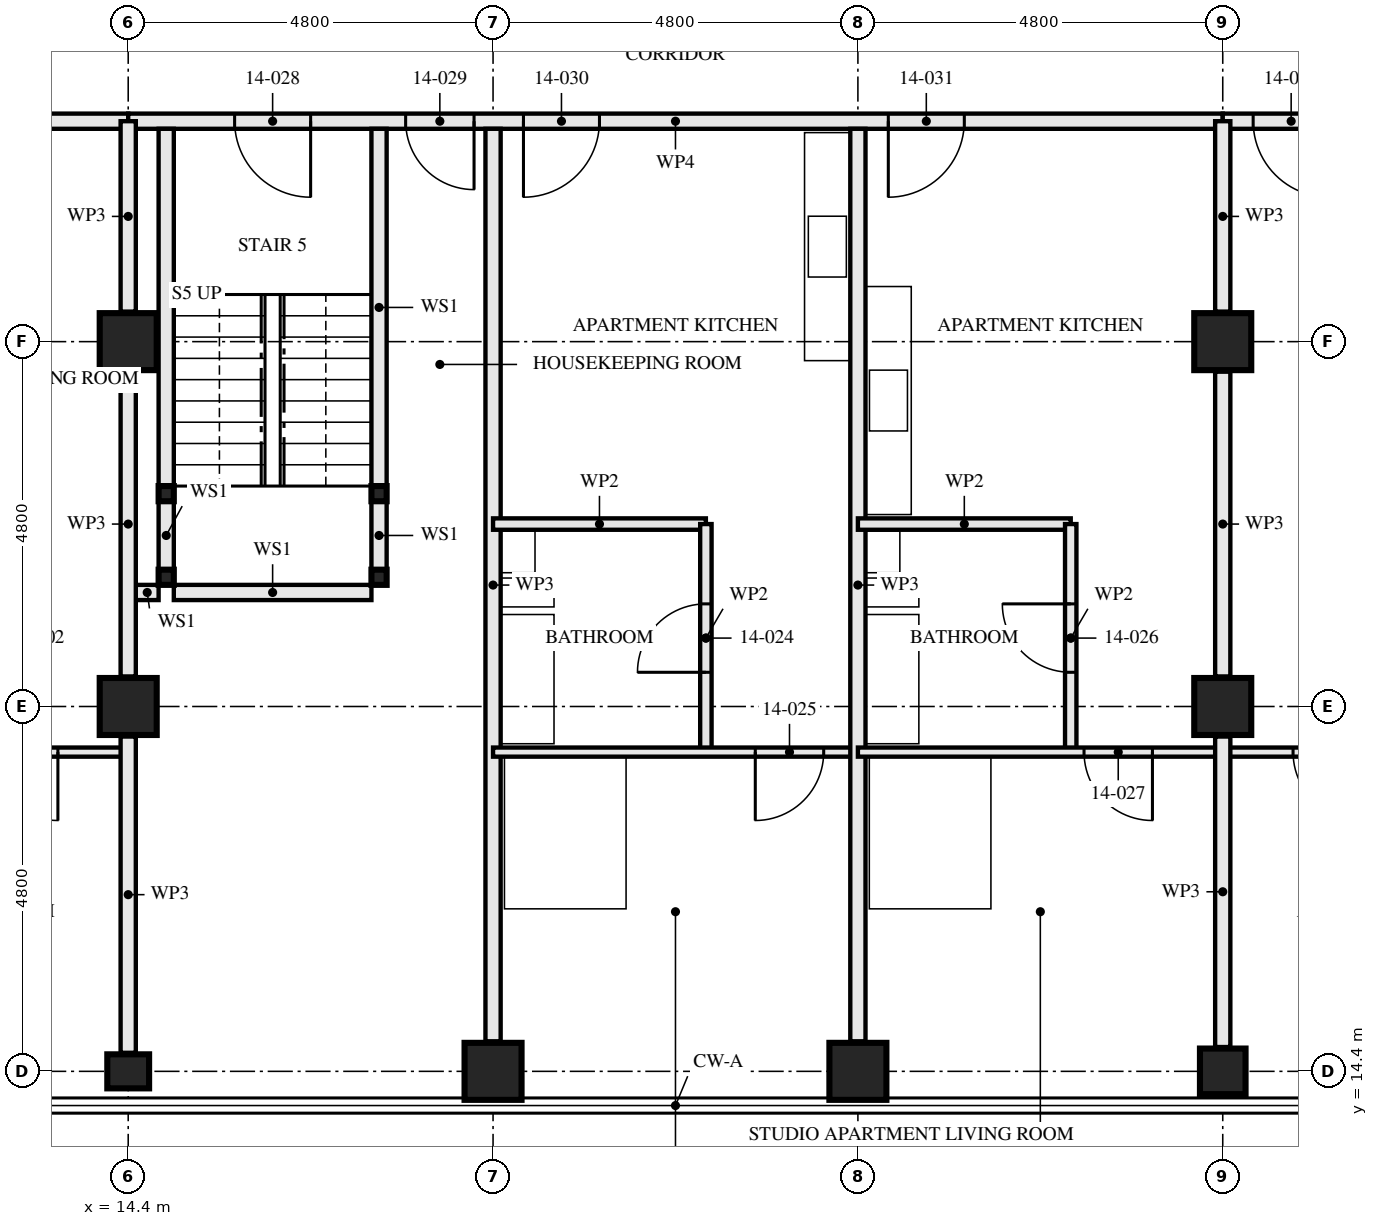
"""IFC4 building model, lengths in metres.
Left out: names, types, materials, properties, quantities, classifications, styles, units other than length and angle.
Written with IfcOpenShell. Run it as: python <this file> out.ifc"""

import sys

from ifc_helpers import new_model, si_unit, direction, frame, frame_2d, origin, origin_2d, place, context, subcontext, project, spatial, rectangle, hollow_rectangle, i_section, extrude, element, fill, save


model = new_model("IFC4")
c1 = context("Model", 3, precision=1e-05, world=origin(), true_north=direction((0.0, 1.0)))
c2 = subcontext(c1, "Body", "Model", "MODEL_VIEW")
j1 = project(units=[si_unit("LENGTHUNIT", "METRE"), si_unit("PLANEANGLEUNIT", "RADIAN")], contexts=[c1])
p1 = place(None, origin())
s1 = spatial("IfcSite", under=j1, at=p1, CompositionType="ELEMENT")
p2 = place(p1, origin())
s2 = spatial("IfcBuilding", under=s1, at=p2, CompositionType="ELEMENT")
p3 = place(p2, frame((0.0, 0.0, 55.0)))
s3 = spatial("IfcBuildingStorey", under=s2, at=p3, CompositionType="ELEMENT", Elevation=55.0)
p4 = place(p3, frame((14.4, 14.4, 0.0), z_axis=(0.0, 0.0, 1.0), x_axis=(0.0, 1.0, 0.0)))
e1 = element("IfcColumn", 1, at=p4, inside=s3, PredefinedType="COLUMN", context=c2, shape_type="SweptSolid", body=[
    extrude(i_section(OverallWidth=0.448, OverallDepth=0.55, WebThickness=0.072, FlangeThickness=0.115, FilletRadius=0.015, at=origin_2d()), origin(), (0.0, 0.0, 1.0), 3.5),
])
for number, where, z_axis, x_axis in (
    (2, (14.4, 19.2, 0.0), (0.0, 0.0, 1.0), (1.0, 0.0, 0.0)),
    (3, (14.4, 24.0, 0.0), (0.0, 0.0, 1.0), (1.0, 0.0, 0.0)),
    (4, (19.2, 14.4, 0.0), (0.0, 0.0, 1.0), (0.0, 1.0, 0.0)),
    (5, (24.0, 14.4, 0.0), (0.0, 0.0, 1.0), (0.0, 1.0, 0.0)),
):
    element("IfcColumn", number, at=place(p3, frame(where, z_axis=z_axis, x_axis=x_axis)), inside=s3, PredefinedType="COLUMN", context=c2, shape_type="SweptSolid", body=[
        extrude(hollow_rectangle(XDim=0.75, YDim=0.75, WallThickness=0.08, at=origin_2d()), origin(), (0.0, 0.0, 1.0), 3.5),
    ])
p5 = place(p3, frame((28.8, 14.4, 0.0), z_axis=(0.0, 0.0, 1.0), x_axis=(0.0, 1.0, 0.0)))
e6 = element("IfcColumn", 6, at=p5, inside=s3, PredefinedType="COLUMN", context=c2, shape_type="SweptSolid", body=[
    extrude(hollow_rectangle(XDim=0.6, YDim=0.6, WallThickness=0.08, at=origin_2d()), origin(), (0.0, 0.0, 1.0), 3.5),
])
for number, where, z_axis, x_axis in (
    (7, (28.8, 19.2, 0.0), (0.0, 0.0, 1.0), (1.0, 0.0, 0.0)),
    (8, (28.8, 24.0, 0.0), (0.0, 0.0, 1.0), (1.0, 0.0, 0.0)),
):
    element("IfcColumn", number, at=place(p3, frame(where, z_axis=z_axis, x_axis=x_axis)), inside=s3, PredefinedType="COLUMN", context=c2, shape_type="SweptSolid", body=[
        extrude(hollow_rectangle(XDim=0.75, YDim=0.75, WallThickness=0.08, at=origin_2d()), origin(), (0.0, 0.0, 1.0), 3.5),
    ])
for number, where, z_axis, x_axis in (
    (9, (14.9, 20.9, 0.0), (0.0, 0.0, 1.0), (1.0, 0.0, 0.0)),
    (10, (17.7, 20.9, 0.0), (0.0, 0.0, 1.0), (1.0, 0.0, 0.0)),
    (11, (14.9, 22.0, 0.0), (0.0, 0.0, 1.0), (1.0, 0.0, 0.0)),
    (12, (17.7, 22.0, 0.0), (0.0, 0.0, 1.0), (1.0, 0.0, 0.0)),
):
    element("IfcColumn", number, at=place(p3, frame(where, z_axis=z_axis, x_axis=x_axis)), inside=s3, PredefinedType="COLUMN", context=c2, shape_type="SweptSolid", body=[
        extrude(hollow_rectangle(XDim=0.2, YDim=0.2, WallThickness=0.008, at=origin_2d()), origin(), (0.0, 0.0, 1.0), 3.33),
    ])
p6 = place(p3, frame((9.6, 18.6, 0.0), z_axis=(0.0, 0.0, 1.0), x_axis=(1.0, 0.0, 0.0)))
e13 = element("IfcWall", 13, at=p6, inside=s3, PredefinedType="PARTITIONING", context=c2, shape_type="SweptSolid", body=[
    extrude(rectangle(XDim=4.8, YDim=0.12, at=frame_2d((2.4, 0.0))), origin(), (0.0, 0.0, 1.0), 3.33),
])
p7 = place(p6, frame((2.975, 0.0, 0.0)))
e14 = element("IfcOpeningElement", 14, at=p7, cuts=e13, PredefinedType="OPENING", context=c2, shape_type="SweptSolid", body=[
    extrude(rectangle(XDim=0.9, YDim=2.1, at=frame_2d((0.45, 1.05))), frame((0.0, 0.071, 0.0), z_axis=(0.0, -1.0, 0.0), x_axis=(1.0, 0.0, 0.0)), (0.0, 0.0, 1.0), 0.141),
])
p8 = place(p3, frame((4.8, 26.9, 0.0), z_axis=(0.0, 0.0, 1.0), x_axis=(1.0, 0.0, 0.0)))
e15 = element("IfcWall", 15, at=p8, inside=s3, PredefinedType="PARTITIONING", context=c2, shape_type="SweptSolid", body=[
    extrude(rectangle(XDim=9.6, YDim=0.2, at=frame_2d((4.8, 0.0))), origin(), (0.0, 0.0, 1.0), 3.33),
])
p9 = place(p8, frame((0.4, 0.0, 0.0)))
e16 = element("IfcOpeningElement", 16, at=p9, cuts=e15, PredefinedType="OPENING", context=c2, shape_type="SweptSolid", body=[
    extrude(rectangle(XDim=1.0, YDim=2.1, at=frame_2d((0.5, 1.05))), frame((0.0, 0.111, 0.0), z_axis=(0.0, -1.0, 0.0), x_axis=(1.0, 0.0, 0.0)), (0.0, 0.0, 1.0), 0.221),
])
p10 = place(p3, frame((14.9, 21.0, 0.0), z_axis=(0.0, 0.0, 1.0), x_axis=(0.0, 1.0, 0.0)))
e17 = element("IfcWall", 17, at=p10, inside=s3, PredefinedType="SOLIDWALL", context=c2, shape_type="SweptSolid", body=[
    extrude(rectangle(XDim=0.9, YDim=0.2, at=frame_2d((0.45, 0.0))), origin(), (0.0, 0.0, 1.0), 2.99),
])
p11 = place(p3, frame((14.9, 22.1, 0.0), z_axis=(0.0, 0.0, 1.0), x_axis=(0.0, 1.0, 0.0)))
e18 = element("IfcWall", 18, at=p11, inside=s3, PredefinedType="SOLIDWALL", context=c2, shape_type="SweptSolid", body=[
    extrude(rectangle(XDim=4.7, YDim=0.2, at=frame_2d((2.35, 0.0))), origin(), (0.0, 0.0, 1.0), 2.99),
])
p12 = place(p3, frame((17.7, 21.0, 0.0), z_axis=(0.0, 0.0, 1.0), x_axis=(0.0, 1.0, 0.0)))
e19 = element("IfcWall", 19, at=p12, inside=s3, PredefinedType="SOLIDWALL", context=c2, shape_type="SweptSolid", body=[
    extrude(rectangle(XDim=0.9, YDim=0.2, at=frame_2d((0.45, 0.0))), origin(), (0.0, 0.0, 1.0), 2.99),
])
p13 = place(p3, frame((17.7, 22.1, 0.0), z_axis=(0.0, 0.0, 1.0), x_axis=(0.0, 1.0, 0.0)))
e20 = element("IfcWall", 20, at=p13, inside=s3, PredefinedType="SOLIDWALL", context=c2, shape_type="SweptSolid", body=[
    extrude(rectangle(XDim=4.7, YDim=0.2, at=frame_2d((2.35, 0.0))), origin(), (0.0, 0.0, 1.0), 2.99),
])
p14 = place(p3, frame((14.5, 20.7, 0.0), z_axis=(0.0, 0.0, 1.0), x_axis=(1.0, 0.0, 0.0)))
e21 = element("IfcWall", 21, at=p14, inside=s3, PredefinedType="SOLIDWALL", context=c2, shape_type="SweptSolid", body=[
    extrude(rectangle(XDim=0.3, YDim=0.2, at=frame_2d((0.15, 0.0))), origin(), (0.0, 0.0, 1.0), 3.33),
])
p15 = place(p3, frame((15.0, 20.7, 0.0), z_axis=(0.0, 0.0, 1.0), x_axis=(1.0, 0.0, 0.0)))
e22 = element("IfcWall", 22, at=p15, inside=s3, PredefinedType="SOLIDWALL", context=c2, shape_type="SweptSolid", body=[
    extrude(rectangle(XDim=2.6, YDim=0.2, at=frame_2d((1.3, 0.0))), origin(), (0.0, 0.0, 1.0), 3.33),
])
p16 = place(p3, frame((19.2, 14.795, 0.0), z_axis=(0.0, 0.0, 1.0), x_axis=(0.0, 1.0, 0.0)))
e23 = element("IfcWall", 23, at=p16, inside=s3, PredefinedType="PARTITIONING", context=c2, shape_type="SweptSolid", body=[
    extrude(rectangle(XDim=12.005, YDim=0.2, at=frame_2d((6.002, 0.0))), origin(), (0.0, 0.0, 1.0), 2.55),
])
p17 = place(p3, frame((22.0, 18.6, 0.0), z_axis=(0.0, 0.0, 1.0), x_axis=(0.0, 1.0, 0.0)))
e24 = element("IfcWall", 24, at=p17, inside=s3, PredefinedType="PARTITIONING", context=c2, shape_type="SweptSolid", body=[
    extrude(rectangle(XDim=3.0, YDim=0.15, at=frame_2d((1.5, 0.0))), origin(), (0.0, 0.0, 1.0), 2.55),
])
p18 = place(p17, frame((1.05, 0.0, 0.0)))
e25 = element("IfcOpeningElement", 25, at=p18, cuts=e24, PredefinedType="OPENING", context=c2, shape_type="SweptSolid", body=[
    extrude(rectangle(XDim=0.9, YDim=2.1, at=frame_2d((0.45, 1.05))), frame((0.0, 0.085, 0.0), z_axis=(0.0, -1.0, 0.0), x_axis=(1.0, 0.0, 0.0)), (0.0, 0.0, 1.0), 0.171),
])
p19 = place(p3, frame((19.2, 21.6, 0.0), z_axis=(0.0, 0.0, 1.0), x_axis=(1.0, 0.0, 0.0)))
e26 = element("IfcWall", 26, at=p19, inside=s3, PredefinedType="PARTITIONING", context=c2, shape_type="SweptSolid", body=[
    extrude(rectangle(XDim=2.8, YDim=0.15, at=frame_2d((1.4, 0.0))), origin(), (0.0, 0.0, 1.0), 3.33),
])
p20 = place(p3, frame((19.2, 18.6, 0.0), z_axis=(0.0, 0.0, 1.0), x_axis=(1.0, 0.0, 0.0)))
e27 = element("IfcWall", 27, at=p20, inside=s3, PredefinedType="PARTITIONING", context=c2, shape_type="SweptSolid", body=[
    extrude(rectangle(XDim=4.8, YDim=0.12, at=frame_2d((2.4, 0.0))), origin(), (0.0, 0.0, 1.0), 3.33),
])
p21 = place(p20, frame((3.45, 0.0, 0.0)))
e28 = element("IfcOpeningElement", 28, at=p21, cuts=e27, PredefinedType="OPENING", context=c2, shape_type="SweptSolid", body=[
    extrude(rectangle(XDim=0.9, YDim=2.1, at=frame_2d((0.45, 1.05))), frame((0.0, 0.071, 0.0), z_axis=(0.0, -1.0, 0.0), x_axis=(1.0, 0.0, 0.0)), (0.0, 0.0, 1.0), 0.141),
])
p22 = place(p3, frame((24.0, 14.795, 0.0), z_axis=(0.0, 0.0, 1.0), x_axis=(0.0, 1.0, 0.0)))
e29 = element("IfcWall", 29, at=p22, inside=s3, PredefinedType="PARTITIONING", context=c2, shape_type="SweptSolid", body=[
    extrude(rectangle(XDim=12.005, YDim=0.2, at=frame_2d((6.002, 0.0))), origin(), (0.0, 0.0, 1.0), 2.55),
])
p23 = place(p3, frame((26.8, 18.6, 0.0), z_axis=(0.0, 0.0, 1.0), x_axis=(0.0, 1.0, 0.0)))
e30 = element("IfcWall", 30, at=p23, inside=s3, PredefinedType="PARTITIONING", context=c2, shape_type="SweptSolid", body=[
    extrude(rectangle(XDim=3.0, YDim=0.15, at=frame_2d((1.5, 0.0))), origin(), (0.0, 0.0, 1.0), 2.55),
])
p24 = place(p23, frame((1.05, 0.0, 0.0)))
e31 = element("IfcOpeningElement", 31, at=p24, cuts=e30, PredefinedType="OPENING", context=c2, shape_type="SweptSolid", body=[
    extrude(rectangle(XDim=0.9, YDim=2.1, at=frame_2d((0.45, 1.05))), frame((0.0, 0.085, 0.0), z_axis=(0.0, -1.0, 0.0), x_axis=(1.0, 0.0, 0.0)), (0.0, 0.0, 1.0), 0.171),
])
p25 = place(p3, frame((24.0, 21.6, 0.0), z_axis=(0.0, 0.0, 1.0), x_axis=(1.0, 0.0, 0.0)))
e32 = element("IfcWall", 32, at=p25, inside=s3, PredefinedType="PARTITIONING", context=c2, shape_type="SweptSolid", body=[
    extrude(rectangle(XDim=2.8, YDim=0.15, at=frame_2d((1.4, 0.0))), origin(), (0.0, 0.0, 1.0), 3.33),
])
p26 = place(p3, frame((24.0, 18.6, 0.0), z_axis=(0.0, 0.0, 1.0), x_axis=(1.0, 0.0, 0.0)))
e33 = element("IfcWall", 33, at=p26, inside=s3, PredefinedType="PARTITIONING", context=c2, shape_type="SweptSolid", body=[
    extrude(rectangle(XDim=4.8, YDim=0.12, at=frame_2d((2.4, 0.0))), origin(), (0.0, 0.0, 1.0), 3.33),
])
p27 = place(p26, frame((2.975, 0.0, 0.0)))
e34 = element("IfcOpeningElement", 34, at=p27, cuts=e33, PredefinedType="OPENING", context=c2, shape_type="SweptSolid", body=[
    extrude(rectangle(XDim=0.9, YDim=2.1, at=frame_2d((0.45, 1.05))), frame((0.0, 0.071, 0.0), z_axis=(0.0, -1.0, 0.0), x_axis=(1.0, 0.0, 0.0)), (0.0, 0.0, 1.0), 0.141),
])
p28 = place(p3, frame((14.4, 26.9, 0.0), z_axis=(0.0, 0.0, 1.0), x_axis=(1.0, 0.0, 0.0)))
e35 = element("IfcWall", 35, at=p28, inside=s3, PredefinedType="PARTITIONING", context=c2, shape_type="SweptSolid", body=[
    extrude(rectangle(XDim=14.4, YDim=0.2, at=frame_2d((7.2, 0.0))), origin(), (0.0, 0.0, 1.0), 2.55),
])
p29 = place(p28, frame((1.4, 0.0, 0.0)))
e36 = element("IfcOpeningElement", 36, at=p29, cuts=e35, PredefinedType="OPENING", context=c2, shape_type="SweptSolid", body=[
    extrude(rectangle(XDim=1.0, YDim=2.1, at=frame_2d((0.5, 1.05))), frame((0.0, 0.111, 0.0), z_axis=(0.0, -1.0, 0.0), x_axis=(1.0, 0.0, 0.0)), (0.0, 0.0, 1.0), 0.221),
])
p30 = place(p28, frame((3.65, 0.0, 0.0)))
e37 = element("IfcOpeningElement", 37, at=p30, cuts=e35, PredefinedType="OPENING", context=c2, shape_type="SweptSolid", body=[
    extrude(rectangle(XDim=0.9, YDim=2.1, at=frame_2d((0.45, 1.05))), frame((0.0, 0.111, 0.0), z_axis=(0.0, -1.0, 0.0), x_axis=(1.0, 0.0, 0.0)), (0.0, 0.0, 1.0), 0.221),
])
p31 = place(p28, frame((5.2, 0.0, 0.0)))
e38 = element("IfcOpeningElement", 38, at=p31, cuts=e35, PredefinedType="OPENING", context=c2, shape_type="SweptSolid", body=[
    extrude(rectangle(XDim=1.0, YDim=2.1, at=frame_2d((0.5, 1.05))), frame((0.0, 0.111, 0.0), z_axis=(0.0, -1.0, 0.0), x_axis=(1.0, 0.0, 0.0)), (0.0, 0.0, 1.0), 0.221),
])
p32 = place(p28, frame((10.0, 0.0, 0.0)))
e39 = element("IfcOpeningElement", 39, at=p32, cuts=e35, PredefinedType="OPENING", context=c2, shape_type="SweptSolid", body=[
    extrude(rectangle(XDim=1.0, YDim=2.1, at=frame_2d((0.5, 1.05))), frame((0.0, 0.111, 0.0), z_axis=(0.0, -1.0, 0.0), x_axis=(1.0, 0.0, 0.0)), (0.0, 0.0, 1.0), 0.221),
])
p33 = place(p3, frame((28.8, 18.6, 0.0), z_axis=(0.0, 0.0, 1.0), x_axis=(1.0, 0.0, 0.0)))
e40 = element("IfcWall", 40, at=p33, inside=s3, PredefinedType="PARTITIONING", context=c2, shape_type="SweptSolid", body=[
    extrude(rectangle(XDim=4.8, YDim=0.12, at=frame_2d((2.4, 0.0))), origin(), (0.0, 0.0, 1.0), 3.33),
])
p34 = place(p33, frame((0.925, 0.0, 0.0)))
e41 = element("IfcOpeningElement", 41, at=p34, cuts=e40, PredefinedType="OPENING", context=c2, shape_type="SweptSolid", body=[
    extrude(rectangle(XDim=0.9, YDim=2.1, at=frame_2d((0.45, 1.05))), frame((0.0, 0.071, 0.0), z_axis=(0.0, -1.0, 0.0), x_axis=(1.0, 0.0, 0.0)), (0.0, 0.0, 1.0), 0.141),
])
p35 = place(p3, frame((28.8, 26.9, 0.0), z_axis=(0.0, 0.0, 1.0), x_axis=(1.0, 0.0, 0.0)))
e42 = element("IfcWall", 42, at=p35, inside=s3, PredefinedType="PARTITIONING", context=c2, shape_type="SweptSolid", body=[
    extrude(rectangle(XDim=9.6, YDim=0.2, at=frame_2d((4.8, 0.0))), origin(), (0.0, 0.0, 1.0), 3.33),
])
p36 = place(p35, frame((0.4, 0.0, 0.0)))
e43 = element("IfcOpeningElement", 43, at=p36, cuts=e42, PredefinedType="OPENING", context=c2, shape_type="SweptSolid", body=[
    extrude(rectangle(XDim=1.0, YDim=2.1, at=frame_2d((0.5, 1.05))), frame((0.0, 0.111, 0.0), z_axis=(0.0, -1.0, 0.0), x_axis=(1.0, 0.0, 0.0)), (0.0, 0.0, 1.0), 0.221),
])
p37 = place(p3, frame((14.4, 14.644, 0.0), z_axis=(0.0, 0.0, 1.0), x_axis=(0.0, 1.0, 0.0)))
e44 = element("IfcWall", 44, at=p37, inside=s3, PredefinedType="PARTITIONING", context=c2, shape_type="SweptSolid", body=[
    extrude(rectangle(XDim=4.161, YDim=0.2, at=frame_2d((2.081, 0.0))), origin(), (0.0, 0.0, 1.0), 2.32),
])
p38 = place(p3, frame((14.4, 19.595, 0.0), z_axis=(0.0, 0.0, 1.0), x_axis=(0.0, 1.0, 0.0)))
e45 = element("IfcWall", 45, at=p38, inside=s3, PredefinedType="PARTITIONING", context=c2, shape_type="SweptSolid", body=[
    extrude(rectangle(XDim=4.01, YDim=0.2, at=frame_2d((2.005, 0.0))), origin(), (0.0, 0.0, 1.0), 2.32),
])
p39 = place(p3, frame((14.4, 24.395, 0.0), z_axis=(0.0, 0.0, 1.0), x_axis=(0.0, 1.0, 0.0)))
e46 = element("IfcWall", 46, at=p39, inside=s3, PredefinedType="PARTITIONING", context=c2, shape_type="SweptSolid", body=[
    extrude(rectangle(XDim=2.505, YDim=0.2, at=frame_2d((1.252, 0.0))), origin(), (0.0, 0.0, 1.0), 2.32),
])
p40 = place(p3, frame((28.8, 14.72, 0.0), z_axis=(0.0, 0.0, 1.0), x_axis=(0.0, 1.0, 0.0)))
e47 = element("IfcWall", 47, at=p40, inside=s3, PredefinedType="PARTITIONING", context=c2, shape_type="SweptSolid", body=[
    extrude(rectangle(XDim=4.085, YDim=0.2, at=frame_2d((2.042, 0.0))), origin(), (0.0, 0.0, 1.0), 2.32),
])
p41 = place(p3, frame((28.8, 19.595, 0.0), z_axis=(0.0, 0.0, 1.0), x_axis=(0.0, 1.0, 0.0)))
e48 = element("IfcWall", 48, at=p41, inside=s3, PredefinedType="PARTITIONING", context=c2, shape_type="SweptSolid", body=[
    extrude(rectangle(XDim=4.01, YDim=0.2, at=frame_2d((2.005, 0.0))), origin(), (0.0, 0.0, 1.0), 2.32),
])
p42 = place(p3, frame((28.8, 24.395, 0.0), z_axis=(0.0, 0.0, 1.0), x_axis=(0.0, 1.0, 0.0)))
e49 = element("IfcWall", 49, at=p42, inside=s3, PredefinedType="PARTITIONING", context=c2, shape_type="SweptSolid", body=[
    extrude(rectangle(XDim=2.505, YDim=0.2, at=frame_2d((1.252, 0.0))), origin(), (0.0, 0.0, 1.0), 2.32),
])
p43 = place(p7, frame((0.9, 0.0, 0.0), z_axis=(0.0, 0.0, 1.0), x_axis=(-1.0, 0.0, 0.0)))
e50 = element("IfcDoor", 50, at=p43, inside=s3, OperationType="SINGLE_SWING_RIGHT", PredefinedType="DOOR", context=c2, shape_type="SweptSolid", body=[
    extrude(rectangle(XDim=0.9, YDim=2.1, at=frame_2d((0.45, 1.05))), frame((0.0, 0.022, 0.0), z_axis=(0.0, -1.0, 0.0), x_axis=(1.0, 0.0, 0.0)), (0.0, 0.0, 1.0), 0.044),
])
fill(e14, e50)
p44 = place(p18, origin())
e51 = element("IfcDoor", 51, at=p44, inside=s3, OperationType="SINGLE_SWING_RIGHT", PredefinedType="DOOR", context=c2, shape_type="SweptSolid", body=[
    extrude(rectangle(XDim=0.9, YDim=2.1, at=frame_2d((0.45, 1.05))), frame((0.0, 0.022, 0.0), z_axis=(0.0, -1.0, 0.0), x_axis=(1.0, 0.0, 0.0)), (0.0, 0.0, 1.0), 0.044),
])
fill(e25, e51)
p45 = place(p21, frame((0.9, 0.0, 0.0), z_axis=(0.0, 0.0, 1.0), x_axis=(-1.0, 0.0, 0.0)))
e52 = element("IfcDoor", 52, at=p45, inside=s3, OperationType="SINGLE_SWING_LEFT", PredefinedType="DOOR", context=c2, shape_type="SweptSolid", body=[
    extrude(rectangle(XDim=0.9, YDim=2.1, at=frame_2d((0.45, 1.05))), frame((0.0, 0.022, 0.0), z_axis=(0.0, -1.0, 0.0), x_axis=(1.0, 0.0, 0.0)), (0.0, 0.0, 1.0), 0.044),
])
fill(e28, e52)
p46 = place(p24, origin())
e53 = element("IfcDoor", 53, at=p46, inside=s3, OperationType="SINGLE_SWING_LEFT", PredefinedType="DOOR", context=c2, shape_type="SweptSolid", body=[
    extrude(rectangle(XDim=0.9, YDim=2.1, at=frame_2d((0.45, 1.05))), frame((0.0, 0.022, 0.0), z_axis=(0.0, -1.0, 0.0), x_axis=(1.0, 0.0, 0.0)), (0.0, 0.0, 1.0), 0.044),
])
fill(e31, e53)
p47 = place(p27, frame((0.9, 0.0, 0.0), z_axis=(0.0, 0.0, 1.0), x_axis=(-1.0, 0.0, 0.0)))
e54 = element("IfcDoor", 54, at=p47, inside=s3, OperationType="SINGLE_SWING_RIGHT", PredefinedType="DOOR", context=c2, shape_type="SweptSolid", body=[
    extrude(rectangle(XDim=0.9, YDim=2.1, at=frame_2d((0.45, 1.05))), frame((0.0, 0.022, 0.0), z_axis=(0.0, -1.0, 0.0), x_axis=(1.0, 0.0, 0.0)), (0.0, 0.0, 1.0), 0.044),
])
fill(e34, e54)
p48 = place(p29, frame((1.0, 0.0, 0.0), z_axis=(0.0, 0.0, 1.0), x_axis=(-1.0, 0.0, 0.0)))
e55 = element("IfcDoor", 55, at=p48, inside=s3, OperationType="SINGLE_SWING_RIGHT", PredefinedType="DOOR", context=c2, shape_type="SweptSolid", body=[
    extrude(rectangle(XDim=1.0, YDim=2.1, at=frame_2d((0.5, 1.05))), frame((0.0, 0.032, 0.0), z_axis=(0.0, -1.0, 0.0), x_axis=(1.0, 0.0, 0.0)), (0.0, 0.0, 1.0), 0.064),
])
fill(e36, e55)
p49 = place(p30, frame((0.9, 0.0, 0.0), z_axis=(0.0, 0.0, 1.0), x_axis=(-1.0, 0.0, 0.0)))
e56 = element("IfcDoor", 56, at=p49, inside=s3, OperationType="SINGLE_SWING_RIGHT", PredefinedType="DOOR", context=c2, shape_type="SweptSolid", body=[
    extrude(rectangle(XDim=0.9, YDim=2.1, at=frame_2d((0.45, 1.05))), frame((0.0, 0.027, 0.0), z_axis=(0.0, -1.0, 0.0), x_axis=(1.0, 0.0, 0.0)), (0.0, 0.0, 1.0), 0.054),
])
fill(e37, e56)
p50 = place(p31, frame((1.0, 0.0, 0.0), z_axis=(0.0, 0.0, 1.0), x_axis=(-1.0, 0.0, 0.0)))
e57 = element("IfcDoor", 57, at=p50, inside=s3, OperationType="SINGLE_SWING_LEFT", PredefinedType="DOOR", context=c2, shape_type="SweptSolid", body=[
    extrude(rectangle(XDim=1.0, YDim=2.1, at=frame_2d((0.5, 1.05))), frame((0.0, 0.027, 0.0), z_axis=(0.0, -1.0, 0.0), x_axis=(1.0, 0.0, 0.0)), (0.0, 0.0, 1.0), 0.054),
])
fill(e38, e57)
p51 = place(p32, frame((1.0, 0.0, 0.0), z_axis=(0.0, 0.0, 1.0), x_axis=(-1.0, 0.0, 0.0)))
e58 = element("IfcDoor", 58, at=p51, inside=s3, OperationType="SINGLE_SWING_LEFT", PredefinedType="DOOR", context=c2, shape_type="SweptSolid", body=[
    extrude(rectangle(XDim=1.0, YDim=2.1, at=frame_2d((0.5, 1.05))), frame((0.0, 0.027, 0.0), z_axis=(0.0, -1.0, 0.0), x_axis=(1.0, 0.0, 0.0)), (0.0, 0.0, 1.0), 0.054),
])
fill(e39, e58)
p52 = place(p34, frame((0.9, 0.0, 0.0), z_axis=(0.0, 0.0, 1.0), x_axis=(-1.0, 0.0, 0.0)))
e59 = element("IfcDoor", 59, at=p52, inside=s3, OperationType="SINGLE_SWING_RIGHT", PredefinedType="DOOR", context=c2, shape_type="SweptSolid", body=[
    extrude(rectangle(XDim=0.9, YDim=2.1, at=frame_2d((0.45, 1.05))), frame((0.0, 0.022, 0.0), z_axis=(0.0, -1.0, 0.0), x_axis=(1.0, 0.0, 0.0)), (0.0, 0.0, 1.0), 0.044),
])
fill(e41, e59)
p53 = place(p36, frame((1.0, 0.0, 0.0), z_axis=(0.0, 0.0, 1.0), x_axis=(-1.0, 0.0, 0.0)))
e60 = element("IfcDoor", 60, at=p53, inside=s3, OperationType="SINGLE_SWING_RIGHT", PredefinedType="DOOR", context=c2, shape_type="SweptSolid", body=[
    extrude(rectangle(XDim=1.0, YDim=2.1, at=frame_2d((0.5, 1.05))), frame((0.0, 0.027, 0.0), z_axis=(0.0, -1.0, 0.0), x_axis=(1.0, 0.0, 0.0)), (0.0, 0.0, 1.0), 0.054),
])
fill(e43, e60)
save(model, sys.argv[1])
